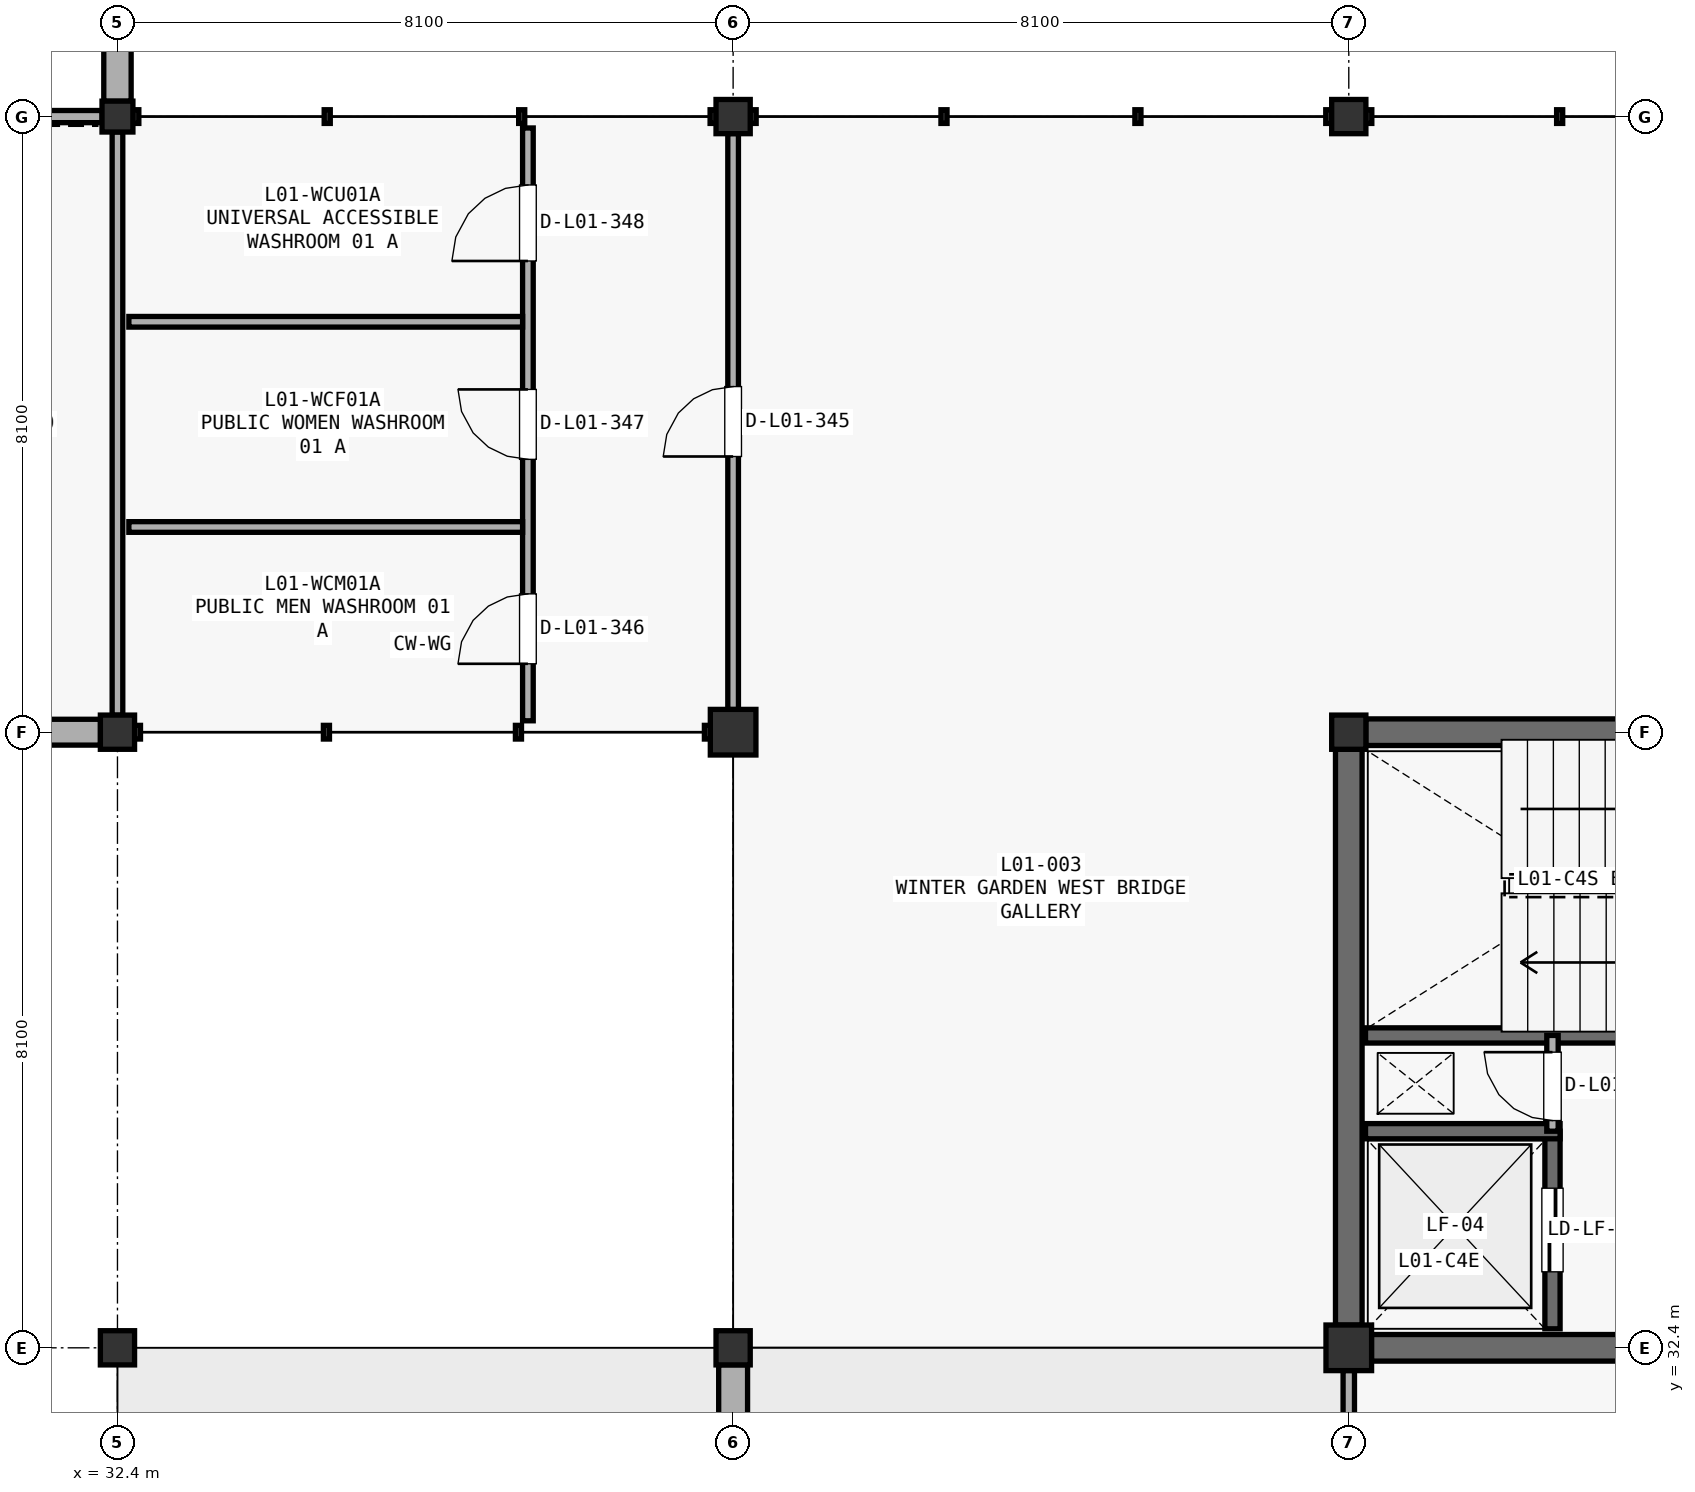
"""IFC4 building model, lengths in metres.
Left out: names, types, materials, properties, quantities, classifications, styles, units other than length and angle.
Written with IfcOpenShell. Run it as: python <this file> out.ifc"""

import sys

from ifc_helpers import new_model, si_unit, direction, frame, frame_2d, origin, origin_2d, place, context, subcontext, project, spatial, rectangle, circle, hollow_circle, extrude, element, fill, save


model = new_model("IFC4")
c1 = context("Model", 3, precision=1e-05, world=origin(), true_north=direction((0.0, 1.0)))
c2 = subcontext(c1, "Body", "Model", "MODEL_VIEW")
j1 = project(units=[si_unit("LENGTHUNIT", "METRE"), si_unit("PLANEANGLEUNIT", "RADIAN")], contexts=[c1])
p1 = place(None, origin())
s1 = spatial("IfcSite", under=j1, at=p1, CompositionType="ELEMENT")
p2 = place(p1, origin())
s2 = spatial("IfcBuilding", under=s1, at=p2, CompositionType="ELEMENT")
p3 = place(p2, frame((0.0, 0.0, 5.1)))
s3 = spatial("IfcBuildingStorey", under=s2, at=p3, CompositionType="ELEMENT", Elevation=5.1)
for number, where, z_axis, x_axis in (
    (1, (32.4, 32.4, 0.0), (0.0, 0.0, 1.0), (1.0, 0.0, 0.0)),
    (2, (32.4, 40.5, 0.0), (0.0, 0.0, 1.0), (1.0, 0.0, 0.0)),
):
    element("IfcColumn", number, at=place(p3, frame(where, z_axis=z_axis, x_axis=x_axis)), inside=s3, PredefinedType="COLUMN", context=c2, shape_type="SweptSolid", body=[
        extrude(rectangle(XDim=0.45, YDim=0.45, at=origin_2d()), origin(), (0.0, 0.0, 1.0), 4.59),
    ])
p4 = place(p3, frame((32.4, 48.6, 0.0), z_axis=(0.0, 0.0, 1.0), x_axis=(1.0, 0.0, 0.0)))
e3 = element("IfcColumn", 3, at=p4, inside=s3, PredefinedType="COLUMN", context=c2, shape_type="SweptSolid", body=[
    extrude(hollow_circle(Radius=0.203, WallThickness=0.016, at=origin_2d()), origin(), (0.0, 0.0, 1.0), 4.59),
])
p5 = place(p3, frame((40.5, 32.4, 0.0), z_axis=(0.0, 0.0, 1.0), x_axis=(1.0, 0.0, 0.0)))
e4 = element("IfcColumn", 4, at=p5, inside=s3, PredefinedType="COLUMN", context=c2, shape_type="SweptSolid", body=[
    extrude(rectangle(XDim=0.45, YDim=0.45, at=origin_2d()), origin(), (0.0, 0.0, 1.0), 4.59),
])
p6 = place(p3, frame((40.5, 40.5, 0.0), z_axis=(0.0, 0.0, 1.0), x_axis=(1.0, 0.0, 0.0)))
e5 = element("IfcColumn", 5, at=p6, inside=s3, PredefinedType="COLUMN", context=c2, shape_type="SweptSolid", body=[
    extrude(circle(Radius=0.3, at=origin_2d()), origin(), (0.0, 0.0, 1.0), 4.59),
])
p7 = place(p3, frame((40.5, 48.6, 0.0), z_axis=(0.0, 0.0, 1.0), x_axis=(1.0, 0.0, 0.0)))
e6 = element("IfcColumn", 6, at=p7, inside=s3, PredefinedType="COLUMN", context=c2, shape_type="SweptSolid", body=[
    extrude(rectangle(XDim=0.45, YDim=0.45, at=origin_2d()), origin(), (0.0, 0.0, 1.0), 4.59),
])
p8 = place(p3, frame((48.6, 32.4, 0.0), z_axis=(0.0, 0.0, 1.0), x_axis=(1.0, 0.0, 0.0)))
e7 = element("IfcColumn", 7, at=p8, inside=s3, PredefinedType="COLUMN", context=c2, shape_type="SweptSolid", body=[
    extrude(circle(Radius=0.3, at=origin_2d()), origin(), (0.0, 0.0, 1.0), 4.59),
])
for number, where, z_axis, x_axis in (
    (8, (48.6, 40.5, 0.0), (0.0, 0.0, 1.0), (1.0, 0.0, 0.0)),
    (9, (48.6, 48.6, 0.0), (0.0, 0.0, 1.0), (1.0, 0.0, 0.0)),
):
    element("IfcColumn", number, at=place(p3, frame(where, z_axis=z_axis, x_axis=x_axis)), inside=s3, PredefinedType="COLUMN", context=c2, shape_type="SweptSolid", body=[
        extrude(rectangle(XDim=0.45, YDim=0.45, at=origin_2d()), origin(), (0.0, 0.0, 1.0), 4.59),
    ])
p9 = place(p3, frame((24.523, 40.5, 0.0), z_axis=(0.0, 0.0, 1.0), x_axis=(1.0, 0.0, 0.0)))
e10 = element("IfcWall", 10, at=p9, inside=s3, PredefinedType="STANDARD", context=c2, shape_type="SweptSolid", body=[
    extrude(rectangle(XDim=7.654, YDim=0.34, at=frame_2d((3.827, 0.0))), origin(), (0.0, 0.0, 1.0), 3.753),
])
p10 = place(p9, frame((2.777, 0.0, 1.25)))
e11 = element("IfcOpeningElement", 11, at=p10, cuts=e10, PredefinedType="OPENING", context=c2, shape_type="SweptSolid", body=[
    extrude(rectangle(XDim=2.1, YDim=1.5, at=frame_2d((1.05, 0.75))), frame((0.0, 0.18, 0.0), z_axis=(0.0, -1.0, 0.0), x_axis=(1.0, 0.0, 0.0)), (0.0, 0.0, 1.0), 0.36),
])
p11 = place(p3, frame((40.5, 24.523, 0.0), z_axis=(0.0, 0.0, 1.0), x_axis=(0.0, 1.0, 0.0)))
e12 = element("IfcWall", 12, at=p11, inside=s3, PredefinedType="STANDARD", context=c2, shape_type="SweptSolid", body=[
    extrude(rectangle(XDim=7.654, YDim=0.38, at=frame_2d((3.827, 0.0))), origin(), (0.0, 0.0, 1.0), 4.007),
])
p12 = place(p11, frame((2.727, 0.0, 0.85)))
e13 = element("IfcOpeningElement", 13, at=p12, cuts=e12, PredefinedType="OPENING", context=c2, shape_type="SweptSolid", body=[
    extrude(rectangle(XDim=2.2, YDim=1.95, at=frame_2d((1.1, 0.975))), frame((0.0, 0.2, 0.0), z_axis=(0.0, -1.0, 0.0), x_axis=(1.0, 0.0, 0.0)), (0.0, 0.0, 1.0), 0.4),
])
p13 = place(p3, frame((32.4, 48.801, -0.38), z_axis=(0.0, 0.0, 1.0), x_axis=(0.0, 1.0, 0.0)))
e14 = element("IfcWall", 14, at=p13, inside=s3, PredefinedType="STANDARD", context=c2, shape_type="SweptSolid", body=[
    extrude(rectangle(XDim=7.676, YDim=0.36, at=frame_2d((3.838, 0.0))), origin(), (0.0, 0.0, 1.0), 4.229),
])
p14 = place(p13, frame((3.163, 0.0, 1.23)))
e15 = element("IfcOpeningElement", 15, at=p14, cuts=e14, PredefinedType="OPENING", context=c2, shape_type="SweptSolid", body=[
    extrude(rectangle(XDim=1.35, YDim=1.95, at=frame_2d((0.675, 0.975))), frame((0.0, 0.19, 0.0), z_axis=(0.0, -1.0, 0.0), x_axis=(1.0, 0.0, 0.0)), (0.0, 0.0, 1.0), 0.38),
])
p15 = place(p3, frame((48.823, 40.5, 0.0), z_axis=(0.0, 0.0, 1.0), x_axis=(1.0, 0.0, 0.0)))
e16 = element("IfcWall", 16, at=p15, inside=s3, PredefinedType="SHEAR", context=c2, shape_type="SweptSolid", body=[
    extrude(rectangle(XDim=7.654, YDim=0.35, at=frame_2d((3.827, 0.0))), origin(), (0.0, 0.0, 1.0), 4.312),
])
p16 = place(p15, frame((5.404, 0.0, 0.0)))
e17 = element("IfcOpeningElement", 17, at=p16, cuts=e16, PredefinedType="OPENING", context=c2, shape_type="SweptSolid", body=[
    extrude(rectangle(XDim=1.2, YDim=2.2, at=frame_2d((0.6, 1.1))), frame((0.0, 0.185, 0.0), z_axis=(0.0, -1.0, 0.0), x_axis=(1.0, 0.0, 0.0)), (0.0, 0.0, 1.0), 0.37),
])
p17 = place(p3, frame((48.6, 32.698, 0.0), z_axis=(0.0, 0.0, 1.0), x_axis=(0.0, 1.0, 0.0)))
e18 = element("IfcWall", 18, at=p17, inside=s3, PredefinedType="SHEAR", context=c2, shape_type="SweptSolid", body=[
    extrude(rectangle(XDim=7.579, YDim=0.35, at=frame_2d((3.79, 0.0))), origin(), (0.0, 0.0, 1.0), 4.312),
])
p18 = place(p3, frame((48.898, 32.4, 0.0), z_axis=(0.0, 0.0, 1.0), x_axis=(1.0, 0.0, 0.0)))
e19 = element("IfcWall", 19, at=p18, inside=s3, PredefinedType="SHEAR", context=c2, shape_type="SweptSolid", body=[
    extrude(rectangle(XDim=7.579, YDim=0.35, at=frame_2d((3.79, 0.0))), origin(), (0.0, 0.0, 1.0), 4.312),
])
p19 = place(p18, frame((4.352, 0.0, 0.0)))
e20 = element("IfcOpeningElement", 20, at=p19, cuts=e19, PredefinedType="OPENING", context=c2, shape_type="SweptSolid", body=[
    extrude(rectangle(XDim=1.2, YDim=2.2, at=frame_2d((0.6, 1.1))), frame((0.0, 0.185, 0.0), z_axis=(0.0, -1.0, 0.0), x_axis=(1.0, 0.0, 0.0)), (0.0, 0.0, 1.0), 0.37),
])
p20 = place(p3, frame((48.82, 36.51, 0.0), z_axis=(0.0, 0.0, 1.0), x_axis=(1.0, 0.0, 0.0)))
e21 = element("IfcWall", 21, at=p20, inside=s3, PredefinedType="SHEAR", context=c2, shape_type="SweptSolid", body=[
    extrude(rectangle(XDim=7.66, YDim=0.2, at=frame_2d((3.83, 0.0))), origin(), (0.0, 0.0, 1.0), 4.312),
])
p21 = place(p20, frame((6.11, 0.0, 0.0)))
e22 = element("IfcOpeningElement", 22, at=p21, cuts=e21, PredefinedType="OPENING", context=c2, shape_type="SweptSolid", body=[
    extrude(rectangle(XDim=1.15, YDim=2.2, at=frame_2d((0.575, 1.1))), frame((0.0, 0.11, 0.0), z_axis=(0.0, -1.0, 0.0), x_axis=(1.0, 0.0, 0.0)), (0.0, 0.0, 1.0), 0.22),
])
p22 = place(p3, frame((51.28, 32.65, 0.0), z_axis=(0.0, 0.0, 1.0), x_axis=(0.0, 1.0, 0.0)))
e23 = element("IfcWall", 23, at=p22, inside=s3, PredefinedType="SHEAR", context=c2, shape_type="SweptSolid", body=[
    extrude(rectangle(XDim=2.6, YDim=0.2, at=frame_2d((1.3, 0.0))), origin(), (0.0, 0.0, 1.0), 4.312),
])
p23 = place(p22, frame((0.75, 0.0, 0.0)))
e24 = element("IfcOpeningElement", 24, at=p23, cuts=e23, PredefinedType="OPENING", context=c2, shape_type="SweptSolid", body=[
    extrude(rectangle(XDim=1.1, YDim=2.2, at=frame_2d((0.55, 1.1))), frame((0.0, 0.11, 0.0), z_axis=(0.0, -1.0, 0.0), x_axis=(1.0, 0.0, 0.0)), (0.0, 0.0, 1.0), 0.22),
])
p24 = place(p3, frame((48.82, 35.25, 0.0), z_axis=(0.0, 0.0, 1.0), x_axis=(1.0, 0.0, 0.0)))
e25 = element("IfcWall", 25, at=p24, inside=s3, PredefinedType="SHEAR", context=c2, shape_type="SweptSolid", body=[
    extrude(rectangle(XDim=2.56, YDim=0.2, at=frame_2d((1.28, 0.0))), origin(), (0.0, 0.0, 1.0), 4.312),
])
p25 = place(p3, frame((51.28, 35.25, 0.0), z_axis=(0.0, 0.0, 1.0), x_axis=(0.0, 1.0, 0.0)))
e26 = element("IfcWall", 26, at=p25, inside=s3, PredefinedType="PARTITIONING", context=c2, shape_type="SweptSolid", body=[
    extrude(rectangle(XDim=1.26, YDim=0.15, at=frame_2d((0.63, 0.0))), origin(), (0.0, 0.0, 1.0), 4.312),
])
p26 = place(p25, frame((0.14, 0.0, 0.0)))
e27 = element("IfcOpeningElement", 27, at=p26, cuts=e26, PredefinedType="OPENING", context=c2, shape_type="SweptSolid", body=[
    extrude(rectangle(XDim=0.9, YDim=2.15, at=frame_2d((0.45, 1.075))), frame((0.0, 0.085, 0.0), z_axis=(0.0, -1.0, 0.0), x_axis=(1.0, 0.0, 0.0)), (0.0, 0.0, 1.0), 0.17),
])
p27 = place(p3, frame((32.4, 40.723, 0.0), z_axis=(0.0, 0.0, 1.0), x_axis=(0.0, 1.0, 0.0)))
e28 = element("IfcWall", 28, at=p27, inside=s3, PredefinedType="PARTITIONING", context=c2, shape_type="SweptSolid", body=[
    extrude(rectangle(XDim=7.676, YDim=0.14, at=frame_2d((3.838, 0.0))), origin(), (0.0, 0.0, 1.0), 3.767),
])
p28 = place(p3, frame((40.5, 40.798, 0.0), z_axis=(0.0, 0.0, 1.0), x_axis=(0.0, 1.0, 0.0)))
e29 = element("IfcWall", 29, at=p28, inside=s3, PredefinedType="PARTITIONING", context=c2, shape_type="SweptSolid", body=[
    extrude(rectangle(XDim=7.579, YDim=0.14, at=frame_2d((3.79, 0.0))), origin(), (0.0, 0.0, 1.0), 3.847),
])
p29 = place(p28, frame((3.33, 0.0, 0.0)))
e30 = element("IfcOpeningElement", 30, at=p29, cuts=e29, PredefinedType="OPENING", context=c2, shape_type="SweptSolid", body=[
    extrude(rectangle(XDim=0.92, YDim=2.15, at=frame_2d((0.46, 1.075))), frame((0.0, 0.08, 0.0), z_axis=(0.0, -1.0, 0.0), x_axis=(1.0, 0.0, 0.0)), (0.0, 0.0, 1.0), 0.16),
])
p30 = place(p3, frame((37.8, 40.65, 0.0), z_axis=(0.0, 0.0, 1.0), x_axis=(0.0, 1.0, 0.0)))
e31 = element("IfcWall", 31, at=p30, inside=s3, PredefinedType="PARTITIONING", context=c2, shape_type="SweptSolid", body=[
    extrude(rectangle(XDim=7.8, YDim=0.14, at=frame_2d((3.9, 0.0))), origin(), (0.0, 0.0, 1.0), 4.312),
])
p31 = place(p30, frame((0.75, 0.0, 0.0)))
e32 = element("IfcOpeningElement", 32, at=p31, cuts=e31, PredefinedType="OPENING", context=c2, shape_type="SweptSolid", body=[
    extrude(rectangle(XDim=0.92, YDim=2.15, at=frame_2d((0.46, 1.075))), frame((0.0, 0.08, 0.0), z_axis=(0.0, -1.0, 0.0), x_axis=(1.0, 0.0, 0.0)), (0.0, 0.0, 1.0), 0.16),
])
p32 = place(p30, frame((3.44, 0.0, 0.0)))
e33 = element("IfcOpeningElement", 33, at=p32, cuts=e31, PredefinedType="OPENING", context=c2, shape_type="SweptSolid", body=[
    extrude(rectangle(XDim=0.92, YDim=2.15, at=frame_2d((0.46, 1.075))), frame((0.0, 0.08, 0.0), z_axis=(0.0, -1.0, 0.0), x_axis=(1.0, 0.0, 0.0)), (0.0, 0.0, 1.0), 0.16),
])
p33 = place(p30, frame((6.05, 0.0, 0.0)))
e34 = element("IfcOpeningElement", 34, at=p33, cuts=e31, PredefinedType="OPENING", context=c2, shape_type="SweptSolid", body=[
    extrude(rectangle(XDim=1.0, YDim=2.15, at=frame_2d((0.5, 1.075))), frame((0.0, 0.08, 0.0), z_axis=(0.0, -1.0, 0.0), x_axis=(1.0, 0.0, 0.0)), (0.0, 0.0, 1.0), 0.16),
])
for number, where, z_axis, x_axis in (
    (35, (32.55, 43.2, 0.0), (0.0, 0.0, 1.0), (1.0, 0.0, 0.0)),
    (36, (32.55, 45.9, 0.0), (0.0, 0.0, 1.0), (1.0, 0.0, 0.0)),
):
    element("IfcWall", number, at=place(p3, frame(where, z_axis=z_axis, x_axis=x_axis)), inside=s3, PredefinedType="PARTITIONING", context=c2, shape_type="SweptSolid", body=[
        extrude(rectangle(XDim=5.18, YDim=0.14, at=frame_2d((2.59, 0.0))), origin(), (0.0, 0.0, 1.0), 4.312),
    ])
p34 = place(p3, frame((24.523, 48.6, 0.0), z_axis=(0.0, 0.0, 1.0), x_axis=(1.0, 0.0, 0.0)))
e37 = element("IfcWall", 37, at=p34, inside=s3, PredefinedType="PARTITIONING", context=c2, shape_type="SweptSolid", body=[
    extrude(rectangle(XDim=7.676, YDim=0.16, at=frame_2d((3.838, 0.0))), origin(), (0.0, 0.0, 1.0), 3.887),
])
p35 = place(p3, frame((48.6, 24.523, 0.0), z_axis=(0.0, 0.0, 1.0), x_axis=(0.0, 1.0, 0.0)))
e38 = element("IfcWall", 38, at=p35, inside=s3, PredefinedType="PARTITIONING", context=c2, shape_type="SweptSolid", body=[
    extrude(rectangle(XDim=7.579, YDim=0.15, at=frame_2d((3.79, 0.0))), origin(), (0.0, 0.0, 1.0), 3.779),
])
p36 = place(p23, origin())
e39 = element("IfcDoor", 39, at=p36, inside=s3, OperationType="SLIDING_TO_LEFT", PredefinedType="DOOR", context=c2, shape_type="SweptSolid", body=[
    extrude(rectangle(XDim=1.1, YDim=2.2, at=frame_2d((0.55, 1.1))), frame((0.0, 0.025, 0.0), z_axis=(0.0, -1.0, 0.0), x_axis=(1.0, 0.0, 0.0)), (0.0, 0.0, 1.0), 0.05),
])
fill(e24, e39)
p37 = place(p26, origin())
e40 = element("IfcDoor", 40, at=p37, inside=s3, OperationType="SINGLE_SWING_RIGHT", PredefinedType="DOOR", context=c2, shape_type="SweptSolid", body=[
    extrude(rectangle(XDim=0.9, YDim=2.15, at=frame_2d((0.45, 1.075))), frame((0.0, 0.025, 0.0), z_axis=(0.0, -1.0, 0.0), x_axis=(1.0, 0.0, 0.0)), (0.0, 0.0, 1.0), 0.05),
])
fill(e27, e40)
p38 = place(p29, origin())
e41 = element("IfcDoor", 41, at=p38, inside=s3, OperationType="SINGLE_SWING_LEFT", PredefinedType="DOOR", context=c2, shape_type="SweptSolid", body=[
    extrude(rectangle(XDim=0.92, YDim=2.15, at=frame_2d((0.46, 1.075))), frame((0.0, 0.025, 0.0), z_axis=(0.0, -1.0, 0.0), x_axis=(1.0, 0.0, 0.0)), (0.0, 0.0, 1.0), 0.05),
])
fill(e30, e41)
p39 = place(p31, origin())
e42 = element("IfcDoor", 42, at=p39, inside=s3, OperationType="SINGLE_SWING_LEFT", PredefinedType="DOOR", context=c2, shape_type="SweptSolid", body=[
    extrude(rectangle(XDim=0.92, YDim=2.15, at=frame_2d((0.46, 1.075))), frame((0.0, 0.025, 0.0), z_axis=(0.0, -1.0, 0.0), x_axis=(1.0, 0.0, 0.0)), (0.0, 0.0, 1.0), 0.05),
])
fill(e32, e42)
p40 = place(p32, origin())
e43 = element("IfcDoor", 43, at=p40, inside=s3, OperationType="SINGLE_SWING_RIGHT", PredefinedType="DOOR", context=c2, shape_type="SweptSolid", body=[
    extrude(rectangle(XDim=0.92, YDim=2.15, at=frame_2d((0.46, 1.075))), frame((0.0, 0.025, 0.0), z_axis=(0.0, -1.0, 0.0), x_axis=(1.0, 0.0, 0.0)), (0.0, 0.0, 1.0), 0.05),
])
fill(e33, e43)
p41 = place(p33, origin())
e44 = element("IfcDoor", 44, at=p41, inside=s3, OperationType="SINGLE_SWING_LEFT", PredefinedType="DOOR", context=c2, shape_type="SweptSolid", body=[
    extrude(rectangle(XDim=1.0, YDim=2.15, at=frame_2d((0.5, 1.075))), frame((0.0, 0.025, 0.0), z_axis=(0.0, -1.0, 0.0), x_axis=(1.0, 0.0, 0.0)), (0.0, 0.0, 1.0), 0.05),
])
fill(e34, e44)
save(model, sys.argv[1])
